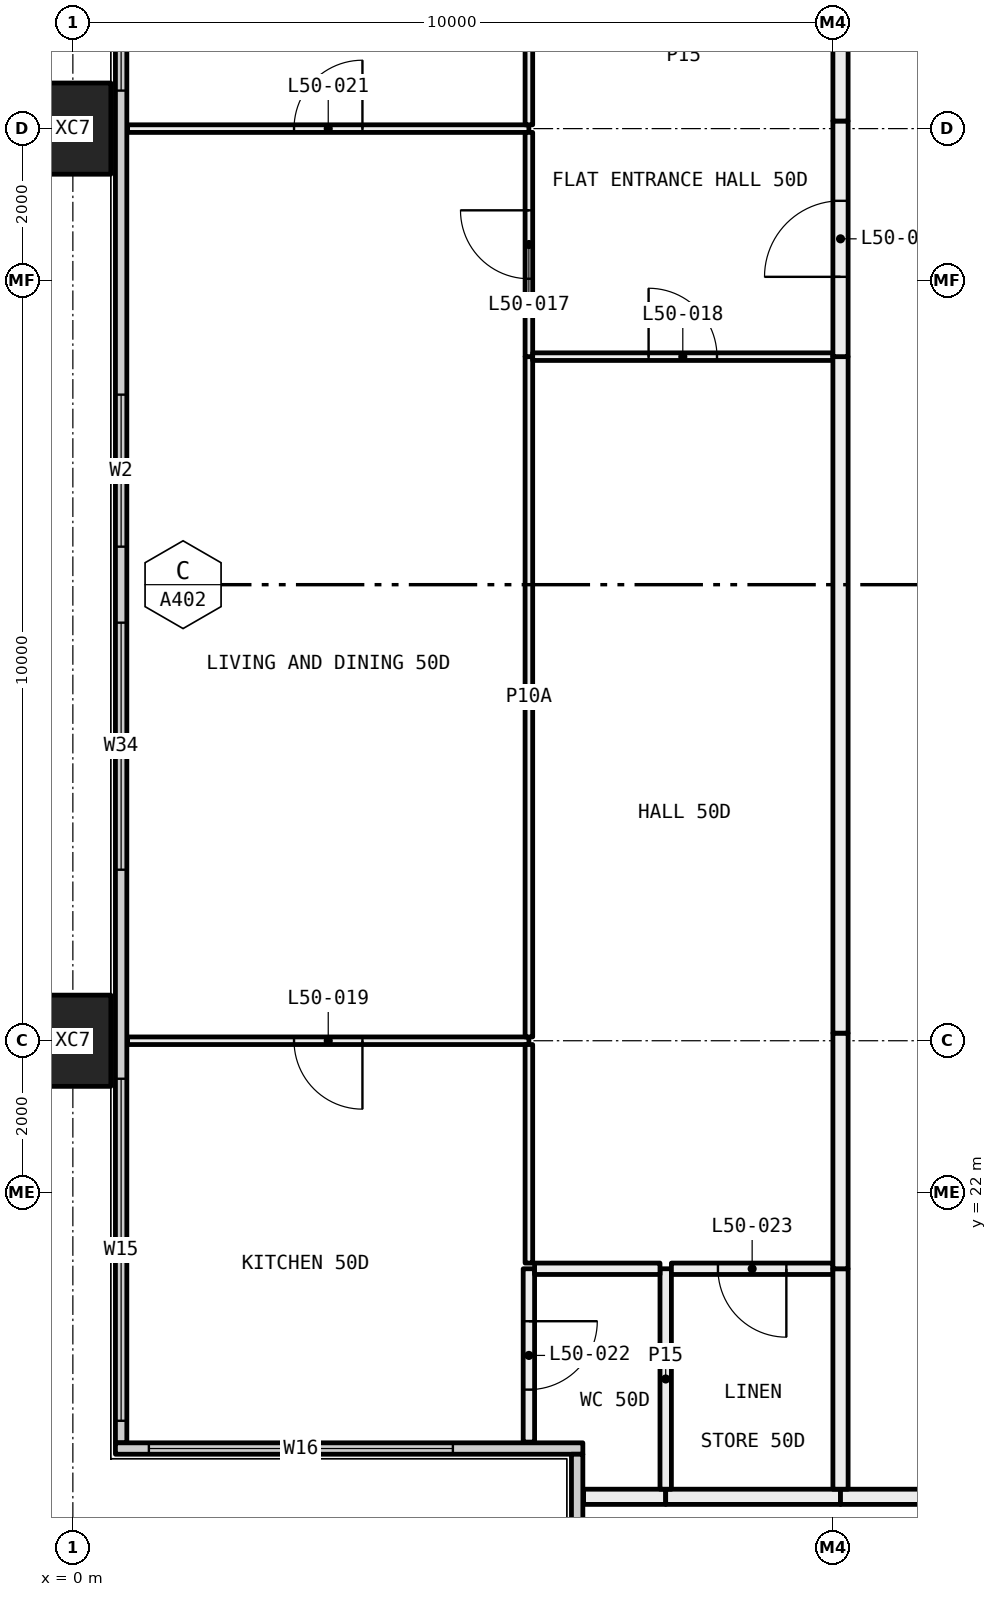
"""IFC4 building model, lengths in metres.
Left out: names, types, materials, properties, quantities, classifications, styles, units other than length and angle.
Written with IfcOpenShell. Run it as: python <this file> out.ifc"""

import sys

from ifc_helpers import new_model, si_unit, direction, frame, frame_2d, origin, origin_2d, place, context, subcontext, project, spatial, rectangle, hollow_rectangle, extrude, element, fill, save


model = new_model("IFC4")
c1 = context("Model", 3, precision=1e-05, world=origin(), true_north=direction((0.0, 1.0)))
c2 = subcontext(c1, "Body", "Model", "MODEL_VIEW")
j1 = project(units=[si_unit("LENGTHUNIT", "METRE"), si_unit("PLANEANGLEUNIT", "RADIAN")], contexts=[c1])
p1 = place(None, origin())
s1 = spatial("IfcSite", under=j1, at=p1, CompositionType="ELEMENT")
p2 = place(p1, origin())
s2 = spatial("IfcBuilding", under=s1, at=p2, CompositionType="ELEMENT")
p3 = place(p2, frame((0.0, 0.0, 189.3)))
s3 = spatial("IfcBuildingStorey", under=s2, at=p3, CompositionType="ELEMENT", Elevation=189.3)
for number, where, z_axis, x_axis in (
    (1, (0.0, 24.0, -0.4), (0.0, 0.0, 1.0), (0.0, 1.0, 0.0)),
    (2, (0.0, 36.0, -0.4), (0.0, 0.0, 1.0), (0.0, 1.0, 0.0)),
):
    element("IfcColumn", number, at=place(p3, frame(where, z_axis=z_axis, x_axis=x_axis)), inside=s3, PredefinedType="COLUMN", context=c2, shape_type="SweptSolid", body=[
        extrude(hollow_rectangle(XDim=1.2, YDim=1.0, WallThickness=0.045, at=origin_2d()), origin(), (0.0, 0.0, 1.0), 3.45),
    ])
p4 = place(p3, frame((0.635, 18.71, 0.0), z_axis=(0.0, 0.0, 1.0), x_axis=(0.0, 1.0, 0.0)))
e3 = element("IfcWall", 3, at=p4, inside=s3, PredefinedType="ELEMENTEDWALL", context=c2, shape_type="SweptSolid", body=[
    extrude(rectangle(XDim=22.58, YDim=0.15, at=frame_2d((11.29, 0.0))), origin(), (0.0, 0.0, 1.0), 3.05),
])
p5 = place(p4, frame((0.29, 0.0, 0.45)))
e4 = element("IfcOpeningElement", 4, at=p5, cuts=e3, PredefinedType="OPENING", context=c2, shape_type="SweptSolid", body=[
    extrude(rectangle(XDim=4.5, YDim=2.55, at=frame_2d((2.25, 1.275))), frame((0.0, 0.085, 0.0), z_axis=(0.0, -1.0, 0.0), x_axis=(1.0, 0.0, 0.0)), (0.0, 0.0, 1.0), 0.17),
])
p6 = place(p4, frame((7.54, 0.0, 0.45)))
e5 = element("IfcOpeningElement", 5, at=p6, cuts=e3, PredefinedType="OPENING", context=c2, shape_type="SweptSolid", body=[
    extrude(rectangle(XDim=3.25, YDim=2.55, at=frame_2d((1.625, 1.275))), frame((0.0, 0.085, 0.0), z_axis=(0.0, -1.0, 0.0), x_axis=(1.0, 0.0, 0.0)), (0.0, 0.0, 1.0), 0.17),
])
p7 = place(p4, frame((11.79, 0.0, 0.45)))
e6 = element("IfcOpeningElement", 6, at=p7, cuts=e3, PredefinedType="OPENING", context=c2, shape_type="SweptSolid", body=[
    extrude(rectangle(XDim=2.0, YDim=2.55, at=frame_2d((1.0, 1.275))), frame((0.0, 0.085, 0.0), z_axis=(0.0, -1.0, 0.0), x_axis=(1.0, 0.0, 0.0)), (0.0, 0.0, 1.0), 0.17),
])
p8 = place(p4, frame((17.79, 0.0, 0.45)))
e7 = element("IfcOpeningElement", 7, at=p8, cuts=e3, PredefinedType="OPENING", context=c2, shape_type="SweptSolid", body=[
    extrude(rectangle(XDim=4.5, YDim=2.55, at=frame_2d((2.25, 1.275))), frame((0.0, 0.085, 0.0), z_axis=(0.0, -1.0, 0.0), x_axis=(1.0, 0.0, 0.0)), (0.0, 0.0, 1.0), 0.17),
])
p9 = place(p3, frame((0.56, 18.635, 0.0), z_axis=(0.0, 0.0, 1.0), x_axis=(1.0, 0.0, 0.0)))
e8 = element("IfcWall", 8, at=p9, inside=s3, PredefinedType="ELEMENTEDWALL", context=c2, shape_type="SweptSolid", body=[
    extrude(rectangle(XDim=6.15, YDim=0.15, at=frame_2d((3.075, 0.0))), origin(), (0.0, 0.0, 1.0), 3.05),
])
p10 = place(p9, frame((0.44, 0.0, 0.45)))
e9 = element("IfcOpeningElement", 9, at=p10, cuts=e8, PredefinedType="OPENING", context=c2, shape_type="SweptSolid", body=[
    extrude(rectangle(XDim=4.0, YDim=2.55, at=frame_2d((2.0, 1.275))), frame((0.0, 0.085, 0.0), z_axis=(0.0, -1.0, 0.0), x_axis=(1.0, 0.0, 0.0)), (0.0, 0.0, 1.0), 0.17),
])
p11 = place(p3, frame((6.635, 12.71, 0.0), z_axis=(0.0, 0.0, 1.0), x_axis=(0.0, 1.0, 0.0)))
e10 = element("IfcWall", 10, at=p11, inside=s3, PredefinedType="ELEMENTEDWALL", context=c2, shape_type="SweptSolid", body=[
    extrude(rectangle(XDim=5.85, YDim=0.15, at=frame_2d((2.925, 0.0))), origin(), (0.0, 0.0, 1.0), 3.05),
])
p12 = place(p11, frame((0.29, 0.0, 0.45)))
e11 = element("IfcOpeningElement", 11, at=p12, cuts=e10, PredefinedType="OPENING", context=c2, shape_type="SweptSolid", body=[
    extrude(rectangle(XDim=4.0, YDim=2.55, at=frame_2d((2.0, 1.275))), frame((0.0, 0.085, 0.0), z_axis=(0.0, -1.0, 0.0), x_axis=(1.0, 0.0, 0.0)), (0.0, 0.0, 1.0), 0.17),
])
p13 = place(p3, frame((7.8, 18.0, 0.0), z_axis=(0.0, 0.0, 1.0), x_axis=(-1.0, 0.0, 0.0)))
e12 = element("IfcWall", 12, at=p13, inside=s3, PredefinedType="PARTITIONING", context=c2, shape_type="SweptSolid", body=[
    extrude(rectangle(XDim=1.08, YDim=0.2, at=frame_2d((0.54, 0.0))), origin(), (0.0, 0.0, 1.0), 3.05),
])
p14 = place(p3, frame((10.1, 18.0, 0.0), z_axis=(0.0, 0.0, 1.0), x_axis=(-1.0, 0.0, 0.0)))
e13 = element("IfcWall", 13, at=p14, inside=s3, PredefinedType="PARTITIONING", context=c2, shape_type="SweptSolid", body=[
    extrude(rectangle(XDim=2.3, YDim=0.2, at=frame_2d((1.15, 0.0))), origin(), (0.0, 0.0, 1.0), 3.05),
])
p15 = place(p3, frame((12.0, 18.0, 0.0), z_axis=(0.0, 0.0, 1.0), x_axis=(-1.0, 0.0, 0.0)))
e14 = element("IfcWall", 14, at=p15, inside=s3, PredefinedType="PARTITIONING", context=c2, shape_type="SweptSolid", body=[
    extrude(rectangle(XDim=1.9, YDim=0.2, at=frame_2d((0.95, 0.0))), origin(), (0.0, 0.0, 1.0), 3.05),
])
p16 = place(p3, frame((6.0, 24.0, 0.0), z_axis=(0.0, 0.0, 1.0), x_axis=(-1.0, 0.0, 0.0)))
e15 = element("IfcWall", 15, at=p16, inside=s3, PredefinedType="PARTITIONING", context=c2, shape_type="SweptSolid", body=[
    extrude(rectangle(XDim=5.28, YDim=0.1, at=frame_2d((2.64, 0.0))), origin(), (0.0, 0.0, 1.0), 2.45),
])
p17 = place(p16, frame((2.19, 0.0, 0.0)))
e16 = element("IfcOpeningElement", 16, at=p17, cuts=e15, PredefinedType="OPENING", context=c2, shape_type="SweptSolid", body=[
    extrude(rectangle(XDim=0.9, YDim=2.1, at=frame_2d((0.45, 1.05))), frame((0.0, 0.06, 0.0), z_axis=(0.0, -1.0, 0.0), x_axis=(1.0, 0.0, 0.0)), (0.0, 0.0, 1.0), 0.12),
])
p18 = place(p3, frame((6.0, 18.72, 0.0), z_axis=(0.0, 0.0, 1.0), x_axis=(0.0, 1.0, 0.0)))
e17 = element("IfcWall", 17, at=p18, inside=s3, PredefinedType="PARTITIONING", context=c2, shape_type="SweptSolid", body=[
    extrude(rectangle(XDim=2.28, YDim=0.15, at=frame_2d((1.14, 0.0))), origin(), (0.0, 0.0, 1.0), 3.05),
])
p19 = place(p18, frame((0.69, 0.0, 0.0)))
e18 = element("IfcOpeningElement", 18, at=p19, cuts=e17, PredefinedType="OPENING", context=c2, shape_type="SweptSolid", body=[
    extrude(rectangle(XDim=0.9, YDim=2.1, at=frame_2d((0.45, 1.05))), frame((0.0, 0.085, 0.0), z_axis=(0.0, -1.0, 0.0), x_axis=(1.0, 0.0, 0.0)), (0.0, 0.0, 1.0), 0.17),
])
p20 = place(p3, frame((6.0, 21.075, 0.0), z_axis=(0.0, 0.0, 1.0), x_axis=(0.0, 1.0, 0.0)))
e19 = element("IfcWall", 19, at=p20, inside=s3, PredefinedType="PARTITIONING", context=c2, shape_type="SweptSolid", body=[
    extrude(rectangle(XDim=2.875, YDim=0.1, at=frame_2d((1.438, 0.0))), origin(), (0.0, 0.0, 1.0), 2.45),
])
p21 = place(p3, frame((6.0, 36.0, 0.0), z_axis=(0.0, 0.0, 1.0), x_axis=(-1.0, 0.0, 0.0)))
e20 = element("IfcWall", 20, at=p21, inside=s3, PredefinedType="PARTITIONING", context=c2, shape_type="SweptSolid", body=[
    extrude(rectangle(XDim=5.28, YDim=0.1, at=frame_2d((2.64, 0.0))), origin(), (0.0, 0.0, 1.0), 2.45),
])
p22 = place(p21, frame((2.19, 0.0, 0.0)))
e21 = element("IfcOpeningElement", 21, at=p22, cuts=e20, PredefinedType="OPENING", context=c2, shape_type="SweptSolid", body=[
    extrude(rectangle(XDim=0.9, YDim=2.1, at=frame_2d((0.45, 1.05))), frame((0.0, 0.06, 0.0), z_axis=(0.0, -1.0, 0.0), x_axis=(1.0, 0.0, 0.0)), (0.0, 0.0, 1.0), 0.12),
])
p23 = place(p3, frame((6.0, 24.05, 0.0), z_axis=(0.0, 0.0, 1.0), x_axis=(0.0, 1.0, 0.0)))
e22 = element("IfcWall", 22, at=p23, inside=s3, PredefinedType="PARTITIONING", context=c2, shape_type="SweptSolid", body=[
    extrude(rectangle(XDim=8.95, YDim=0.1, at=frame_2d((4.475, 0.0))), origin(), (0.0, 0.0, 1.0), 2.45),
])
p24 = place(p3, frame((6.0, 33.0, 0.0), z_axis=(0.0, 0.0, 1.0), x_axis=(0.0, 1.0, 0.0)))
e23 = element("IfcWall", 23, at=p24, inside=s3, PredefinedType="PARTITIONING", context=c2, shape_type="SweptSolid", body=[
    extrude(rectangle(XDim=2.95, YDim=0.1, at=frame_2d((1.475, 0.0))), origin(), (0.0, 0.0, 1.0), 2.45),
])
p25 = place(p24, frame((1.025, 0.0, 0.0)))
e24 = element("IfcOpeningElement", 24, at=p25, cuts=e23, PredefinedType="OPENING", context=c2, shape_type="SweptSolid", body=[
    extrude(rectangle(XDim=0.9, YDim=2.1, at=frame_2d((0.45, 1.05))), frame((0.0, 0.06, 0.0), z_axis=(0.0, -1.0, 0.0), x_axis=(1.0, 0.0, 0.0)), (0.0, 0.0, 1.0), 0.12),
])
p26 = place(p3, frame((6.0, 36.05, 0.0), z_axis=(0.0, 0.0, 1.0), x_axis=(0.0, 1.0, 0.0)))
e25 = element("IfcWall", 25, at=p26, inside=s3, PredefinedType="PARTITIONING", context=c2, shape_type="SweptSolid", body=[
    extrude(rectangle(XDim=1.375, YDim=0.1, at=frame_2d((0.688, 0.0))), origin(), (0.0, 0.0, 1.0), 2.45),
])
p27 = place(p3, frame((7.8, 18.1, 0.0), z_axis=(0.0, 0.0, 1.0), x_axis=(0.0, 1.0, 0.0)))
e26 = element("IfcWall", 26, at=p27, inside=s3, PredefinedType="PARTITIONING", context=c2, shape_type="SweptSolid", body=[
    extrude(rectangle(XDim=2.9, YDim=0.15, at=frame_2d((1.45, 0.0))), origin(), (0.0, 0.0, 1.0), 3.05),
])
p28 = place(p3, frame((7.725, 21.0, 0.0), z_axis=(0.0, 0.0, 1.0), x_axis=(-1.0, 0.0, 0.0)))
e27 = element("IfcWall", 27, at=p28, inside=s3, PredefinedType="PARTITIONING", context=c2, shape_type="SweptSolid", body=[
    extrude(rectangle(XDim=1.65, YDim=0.15, at=frame_2d((0.825, 0.0))), origin(), (0.0, 0.0, 1.0), 3.05),
])
p29 = place(p3, frame((10.0, 21.0, 0.0), z_axis=(0.0, 0.0, 1.0), x_axis=(-1.0, 0.0, 0.0)))
e28 = element("IfcWall", 28, at=p29, inside=s3, PredefinedType="PARTITIONING", context=c2, shape_type="SweptSolid", body=[
    extrude(rectangle(XDim=2.125, YDim=0.15, at=frame_2d((1.062, 0.0))), origin(), (0.0, 0.0, 1.0), 3.05),
])
p30 = place(p29, frame((0.613, 0.0, 0.0)))
e29 = element("IfcOpeningElement", 29, at=p30, cuts=e28, PredefinedType="OPENING", context=c2, shape_type="SweptSolid", body=[
    extrude(rectangle(XDim=0.9, YDim=2.1, at=frame_2d((0.45, 1.05))), frame((0.0, 0.085, 0.0), z_axis=(0.0, -1.0, 0.0), x_axis=(1.0, 0.0, 0.0)), (0.0, 0.0, 1.0), 0.17),
])
p31 = place(p3, frame((10.1, 18.1, 0.0), z_axis=(0.0, 0.0, 1.0), x_axis=(0.0, 1.0, 0.0)))
e30 = element("IfcWall", 30, at=p31, inside=s3, PredefinedType="PARTITIONING", context=c2, shape_type="SweptSolid", body=[
    extrude(rectangle(XDim=2.9, YDim=0.2, at=frame_2d((1.45, 0.0))), origin(), (0.0, 0.0, 1.0), 3.05),
])
p32 = place(p3, frame((10.0, 33.0, 0.0), z_axis=(0.0, 0.0, 1.0), x_axis=(-1.0, 0.0, 0.0)))
e31 = element("IfcWall", 31, at=p32, inside=s3, PredefinedType="PARTITIONING", context=c2, shape_type="SweptSolid", body=[
    extrude(rectangle(XDim=3.95, YDim=0.1, at=frame_2d((1.975, 0.0))), origin(), (0.0, 0.0, 1.0), 3.05),
])
p33 = place(p32, frame((1.525, 0.0, 0.0)))
e32 = element("IfcOpeningElement", 32, at=p33, cuts=e31, PredefinedType="OPENING", context=c2, shape_type="SweptSolid", body=[
    extrude(rectangle(XDim=0.9, YDim=2.1, at=frame_2d((0.45, 1.05))), frame((0.0, 0.06, 0.0), z_axis=(0.0, -1.0, 0.0), x_axis=(1.0, 0.0, 0.0)), (0.0, 0.0, 1.0), 0.12),
])
p34 = place(p3, frame((10.1, 21.0, 0.0), z_axis=(0.0, 0.0, 1.0), x_axis=(0.0, 1.0, 0.0)))
e33 = element("IfcWall", 33, at=p34, inside=s3, PredefinedType="PARTITIONING", context=c2, shape_type="SweptSolid", body=[
    extrude(rectangle(XDim=3.1, YDim=0.2, at=frame_2d((1.55, 0.0))), origin(), (0.0, 0.0, 1.0), 2.45),
])
p35 = place(p3, frame((10.1, 24.1, 0.0), z_axis=(0.0, 0.0, 1.0), x_axis=(0.0, 1.0, 0.0)))
e34 = element("IfcWall", 34, at=p35, inside=s3, PredefinedType="PARTITIONING", context=c2, shape_type="SweptSolid", body=[
    extrude(rectangle(XDim=8.9, YDim=0.2, at=frame_2d((4.45, 0.0))), origin(), (0.0, 0.0, 1.0), 3.05),
])
p36 = place(p3, frame((10.1, 33.0, 0.0), z_axis=(0.0, 0.0, 1.0), x_axis=(0.0, 1.0, 0.0)))
e35 = element("IfcWall", 35, at=p36, inside=s3, PredefinedType="PARTITIONING", context=c2, shape_type="SweptSolid", body=[
    extrude(rectangle(XDim=3.1, YDim=0.2, at=frame_2d((1.55, 0.0))), origin(), (0.0, 0.0, 1.0), 2.45),
])
p37 = place(p36, frame((1.05, 0.0, 0.0)))
e36 = element("IfcOpeningElement", 36, at=p37, cuts=e35, PredefinedType="OPENING", context=c2, shape_type="SweptSolid", body=[
    extrude(rectangle(XDim=1.0, YDim=2.1, at=frame_2d((0.5, 1.05))), frame((0.0, 0.11, 0.0), z_axis=(0.0, -1.0, 0.0), x_axis=(1.0, 0.0, 0.0)), (0.0, 0.0, 1.0), 0.22),
])
p38 = place(p3, frame((10.1, 36.1, 0.0), z_axis=(0.0, 0.0, 1.0), x_axis=(0.0, 1.0, 0.0)))
e37 = element("IfcWall", 37, at=p38, inside=s3, PredefinedType="PARTITIONING", context=c2, shape_type="SweptSolid", body=[
    extrude(rectangle(XDim=1.4, YDim=0.2, at=frame_2d((0.7, 0.0))), origin(), (0.0, 0.0, 1.0), 3.05),
])
p39 = place(p5, origin())
e38 = element("IfcWindow", 38, at=p39, inside=s3, PartitioningType="SINGLE_PANEL", PredefinedType="WINDOW", context=c2, shape_type="SweptSolid", body=[
    extrude(rectangle(XDim=4.5, YDim=2.55, at=frame_2d((2.25, 1.275))), frame((0.0, 0.03, 0.0), z_axis=(0.0, -1.0, 0.0), x_axis=(1.0, 0.0, 0.0)), (0.0, 0.0, 1.0), 0.06),
])
fill(e4, e38)
p40 = place(p6, origin())
e39 = element("IfcWindow", 39, at=p40, inside=s3, PartitioningType="SINGLE_PANEL", PredefinedType="WINDOW", context=c2, shape_type="SweptSolid", body=[
    extrude(rectangle(XDim=3.25, YDim=2.55, at=frame_2d((1.625, 1.275))), frame((0.0, 0.03, 0.0), z_axis=(0.0, -1.0, 0.0), x_axis=(1.0, 0.0, 0.0)), (0.0, 0.0, 1.0), 0.06),
])
fill(e5, e39)
p41 = place(p7, origin())
e40 = element("IfcWindow", 40, at=p41, inside=s3, PartitioningType="SINGLE_PANEL", PredefinedType="WINDOW", context=c2, shape_type="SweptSolid", body=[
    extrude(rectangle(XDim=2.0, YDim=2.55, at=frame_2d((1.0, 1.275))), frame((0.0, 0.03, 0.0), z_axis=(0.0, -1.0, 0.0), x_axis=(1.0, 0.0, 0.0)), (0.0, 0.0, 1.0), 0.06),
])
fill(e6, e40)
p42 = place(p8, origin())
e41 = element("IfcWindow", 41, at=p42, inside=s3, PartitioningType="SINGLE_PANEL", PredefinedType="WINDOW", context=c2, shape_type="SweptSolid", body=[
    extrude(rectangle(XDim=4.5, YDim=2.55, at=frame_2d((2.25, 1.275))), frame((0.0, 0.03, 0.0), z_axis=(0.0, -1.0, 0.0), x_axis=(1.0, 0.0, 0.0)), (0.0, 0.0, 1.0), 0.06),
])
fill(e7, e41)
p43 = place(p10, origin())
e42 = element("IfcWindow", 42, at=p43, inside=s3, PartitioningType="SINGLE_PANEL", PredefinedType="WINDOW", context=c2, shape_type="SweptSolid", body=[
    extrude(rectangle(XDim=4.0, YDim=2.55, at=frame_2d((2.0, 1.275))), frame((0.0, 0.03, 0.0), z_axis=(0.0, -1.0, 0.0), x_axis=(1.0, 0.0, 0.0)), (0.0, 0.0, 1.0), 0.06),
])
fill(e9, e42)
p44 = place(p37, origin())
e43 = element("IfcDoor", 43, at=p44, inside=s3, OperationType="SINGLE_SWING_RIGHT", PredefinedType="DOOR", context=c2, shape_type="SweptSolid", body=[
    extrude(rectangle(XDim=1.0, YDim=2.1, at=frame_2d((0.5, 1.05))), frame((0.0, 0.025, 0.0), z_axis=(0.0, -1.0, 0.0), x_axis=(1.0, 0.0, 0.0)), (0.0, 0.0, 1.0), 0.05),
])
fill(e36, e43)
p45 = place(p25, origin())
e44 = element("IfcDoor", 44, at=p45, inside=s3, OperationType="SINGLE_SWING_LEFT", PredefinedType="DOOR", context=c2, shape_type="SweptSolid", body=[
    extrude(rectangle(XDim=0.9, YDim=2.1, at=frame_2d((0.45, 1.05))), frame((0.0, 0.025, 0.0), z_axis=(0.0, -1.0, 0.0), x_axis=(1.0, 0.0, 0.0)), (0.0, 0.0, 1.0), 0.05),
])
fill(e24, e44)
p46 = place(p33, frame((0.9, 0.0, 0.0), x_axis=(-1.0, 0.0, 0.0)))
e45 = element("IfcDoor", 45, at=p46, inside=s3, OperationType="SINGLE_SWING_RIGHT", PredefinedType="DOOR", context=c2, shape_type="SweptSolid", body=[
    extrude(rectangle(XDim=0.9, YDim=2.1, at=frame_2d((0.45, 1.05))), frame((0.0, 0.025, 0.0), z_axis=(0.0, -1.0, 0.0), x_axis=(1.0, 0.0, 0.0)), (0.0, 0.0, 1.0), 0.05),
])
fill(e32, e45)
p47 = place(p17, origin())
e46 = element("IfcDoor", 46, at=p47, inside=s3, OperationType="SINGLE_SWING_RIGHT", PredefinedType="DOOR", context=c2, shape_type="SweptSolid", body=[
    extrude(rectangle(XDim=0.9, YDim=2.1, at=frame_2d((0.45, 1.05))), frame((0.0, 0.025, 0.0), z_axis=(0.0, -1.0, 0.0), x_axis=(1.0, 0.0, 0.0)), (0.0, 0.0, 1.0), 0.05),
])
fill(e16, e46)
p48 = place(p22, frame((0.9, 0.0, 0.0), x_axis=(-1.0, 0.0, 0.0)))
e47 = element("IfcDoor", 47, at=p48, inside=s3, OperationType="SINGLE_SWING_LEFT", PredefinedType="DOOR", context=c2, shape_type="SweptSolid", body=[
    extrude(rectangle(XDim=0.9, YDim=2.1, at=frame_2d((0.45, 1.05))), frame((0.0, 0.025, 0.0), z_axis=(0.0, -1.0, 0.0), x_axis=(1.0, 0.0, 0.0)), (0.0, 0.0, 1.0), 0.05),
])
fill(e21, e47)
p49 = place(p19, frame((0.9, 0.0, 0.0), x_axis=(-1.0, 0.0, 0.0)))
e48 = element("IfcDoor", 48, at=p49, inside=s3, OperationType="SINGLE_SWING_RIGHT", PredefinedType="DOOR", context=c2, shape_type="SweptSolid", body=[
    extrude(rectangle(XDim=0.9, YDim=2.1, at=frame_2d((0.45, 1.05))), frame((0.0, 0.025, 0.0), z_axis=(0.0, -1.0, 0.0), x_axis=(1.0, 0.0, 0.0)), (0.0, 0.0, 1.0), 0.05),
])
fill(e18, e48)
p50 = place(p30, origin())
e49 = element("IfcDoor", 49, at=p50, inside=s3, OperationType="SINGLE_SWING_RIGHT", PredefinedType="DOOR", context=c2, shape_type="SweptSolid", body=[
    extrude(rectangle(XDim=0.9, YDim=2.1, at=frame_2d((0.45, 1.05))), frame((0.0, 0.025, 0.0), z_axis=(0.0, -1.0, 0.0), x_axis=(1.0, 0.0, 0.0)), (0.0, 0.0, 1.0), 0.05),
])
fill(e29, e49)
save(model, sys.argv[1])
